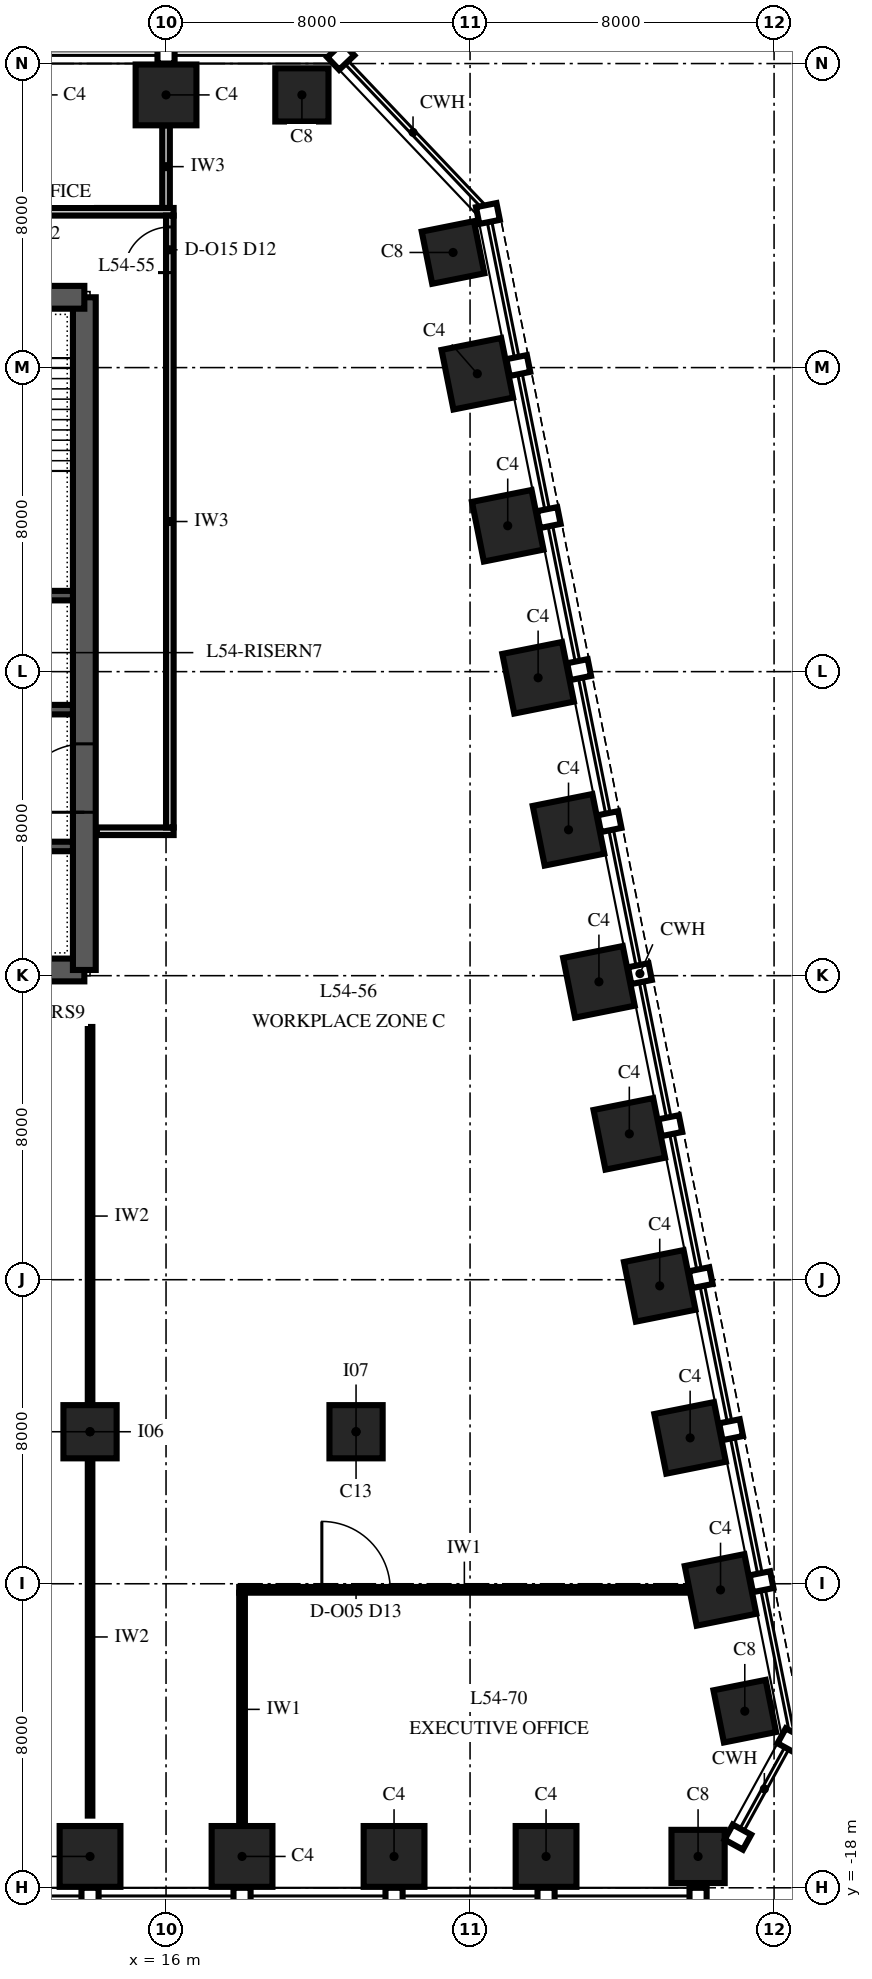
"""IFC4 building model, lengths in metres.
Left out: names, types, materials, properties, quantities, classifications, styles, units other than length and angle.
Written with IfcOpenShell. Run it as: python <this file> out.ifc"""

import sys

from ifc_helpers import new_model, si_unit, direction, frame, frame_2d, origin, origin_2d, place, context, subcontext, project, spatial, polyline, rectangle, outline, extrude, element, fill, save


model = new_model("IFC4")
c1 = context("Model", 3, precision=1e-05, world=origin(), true_north=direction((0.0, 1.0)))
c2 = subcontext(c1, "Body", "Model", "MODEL_VIEW")
j1 = project(units=[si_unit("LENGTHUNIT", "METRE"), si_unit("PLANEANGLEUNIT", "RADIAN")], contexts=[c1])
p1 = place(None, origin())
s1 = spatial("IfcSite", under=j1, at=p1, CompositionType="ELEMENT")
p2 = place(p1, origin())
s2 = spatial("IfcBuilding", under=s1, at=p2, CompositionType="ELEMENT")
p3 = place(p2, frame((0.0, 0.0, 234.0)))
s3 = spatial("IfcBuildingStorey", under=s2, at=p3, CompositionType="ELEMENT", Elevation=234.0)
for number, where, z_axis, x_axis in (
    (1, (14.0, -17.175, 0.0), (0.0, 0.0, 1.0), (1.0, 0.0, 0.0)),
    (2, (18.0, -17.175, 0.0), (0.0, 0.0, 1.0), (1.0, 0.0, 0.0)),
    (3, (22.0, -17.175, 0.0), (0.0, 0.0, 1.0), (1.0, 0.0, 0.0)),
    (4, (26.0, -17.175, 0.0), (0.0, 0.0, 1.0), (1.0, 0.0, 0.0)),
):
    element("IfcColumn", number, at=place(p3, frame(where, z_axis=z_axis, x_axis=x_axis)), inside=s3, PredefinedType="COLUMN", context=c2, shape_type="SweptSolid", body=[
        extrude(rectangle(XDim=1.6, YDim=1.6, at=origin_2d()), origin(), (0.0, 0.0, 1.0), 4.0),
    ])
for number, where, z_axis, x_axis in (
    (5, (30.0, -17.175, 0.0), (0.0, 0.0, 1.0), (1.0, 0.0, 0.0)),
    (6, (31.229, -13.353, 0.0), (0.0, 0.0, 1.0), (-0.196, 0.981, 0.0)),
):
    element("IfcColumn", number, at=place(p3, frame(where, z_axis=z_axis, x_axis=x_axis)), inside=s3, PredefinedType="COLUMN", context=c2, shape_type="SweptSolid", body=[
        extrude(rectangle(XDim=1.4, YDim=1.4, at=origin_2d()), origin(), (0.0, 0.0, 1.0), 4.0),
    ])
for number, where, z_axis, x_axis in (
    (7, (30.591, -10.162, 0.0), (0.0, 0.0, 1.0), (-0.196, 0.981, 0.0)),
    (8, (29.791, -6.162, 0.0), (0.0, 0.0, 1.0), (-0.196, 0.981, 0.0)),
    (9, (28.991, -2.162, 0.0), (0.0, 0.0, 1.0), (-0.196, 0.981, 0.0)),
    (10, (28.191, 1.838, 0.0), (0.0, 0.0, 1.0), (-0.196, 0.981, 0.0)),
    (11, (27.391, 5.838, 0.0), (0.0, 0.0, 1.0), (-0.196, 0.981, 0.0)),
    (12, (26.591, 9.838, 0.0), (0.0, 0.0, 1.0), (-0.196, 0.981, 0.0)),
    (13, (25.791, 13.838, 0.0), (0.0, 0.0, 1.0), (-0.196, 0.981, 0.0)),
    (14, (24.991, 17.838, 0.0), (0.0, 0.0, 1.0), (-0.196, 0.981, 0.0)),
    (15, (24.191, 21.838, 0.0), (0.0, 0.0, 1.0), (-0.196, 0.981, 0.0)),
):
    element("IfcColumn", number, at=place(p3, frame(where, z_axis=z_axis, x_axis=x_axis)), inside=s3, PredefinedType="COLUMN", context=c2, shape_type="SweptSolid", body=[
        extrude(rectangle(XDim=1.6, YDim=1.6, at=origin_2d()), origin(), (0.0, 0.0, 1.0), 4.0),
    ])
for number, where, z_axis, x_axis in (
    (16, (23.553, 25.029, 0.0), (0.0, 0.0, 1.0), (-0.196, 0.981, 0.0)),
    (17, (19.575, 29.175, 0.0), (0.0, 0.0, 1.0), (-1.0, 0.0, 0.0)),
):
    element("IfcColumn", number, at=place(p3, frame(where, z_axis=z_axis, x_axis=x_axis)), inside=s3, PredefinedType="COLUMN", context=c2, shape_type="SweptSolid", body=[
        extrude(rectangle(XDim=1.4, YDim=1.4, at=origin_2d()), origin(), (0.0, 0.0, 1.0), 4.0),
    ])
p4 = place(p3, frame((16.0, 29.175, 0.0), z_axis=(0.0, 0.0, 1.0), x_axis=(-1.0, 0.0, 0.0)))
e18 = element("IfcColumn", 18, at=p4, inside=s3, PredefinedType="COLUMN", context=c2, shape_type="SweptSolid", body=[
    extrude(rectangle(XDim=1.6, YDim=1.6, at=origin_2d()), origin(), (0.0, 0.0, 1.0), 4.0),
])
for number, where, z_axis, x_axis in (
    (19, (14.0, -6.0, 0.0), (0.0, 0.0, 1.0), (1.0, 0.0, 0.0)),
    (20, (21.0, -6.0, 0.0), (0.0, 0.0, 1.0), (1.0, 0.0, 0.0)),
):
    element("IfcColumn", number, at=place(p3, frame(where, z_axis=z_axis, x_axis=x_axis)), inside=s3, PredefinedType="COLUMN", context=c2, shape_type="SweptSolid", body=[
        extrude(rectangle(XDim=1.4, YDim=1.4, at=origin_2d()), origin(), (0.0, 0.0, 1.0), 4.0),
    ])
p5 = place(p3, frame((-13.85, 6.15, 0.0), z_axis=(0.0, 0.0, 1.0), x_axis=(1.0, 0.0, 0.0)))
e21 = element("IfcWall", 21, at=p5, inside=s3, PredefinedType="SHEAR", context=c2, shape_type="SweptSolid", body=[
    extrude(rectangle(XDim=27.7, YDim=0.6, at=frame_2d((13.85, 0.0))), origin(), (0.0, 0.0, 1.0), 4.0),
])
p6 = place(p3, frame((13.85, 6.15, 0.0), z_axis=(0.0, 0.0, 1.0), x_axis=(0.0, 1.0, 0.0)))
e22 = element("IfcWall", 22, at=p6, inside=s3, PredefinedType="SHEAR", context=c2, shape_type="SweptSolid", body=[
    extrude(outline(polyline([(0.0, -0.3), (17.7, -0.3), (17.7, 0.0), (17.4, 0.0), (17.4, 0.3), (0.3, 0.3), (0.3, 0.0), (0.0, 0.0), (0.0, -0.3)])), origin(), (0.0, 0.0, 1.0), 4.0),
])
p7 = place(p6, frame((4.15, 0.0, 0.0)))
e23 = element("IfcOpeningElement", 23, at=p7, cuts=e22, PredefinedType="OPENING", context=c2, shape_type="SweptSolid", body=[
    extrude(rectangle(XDim=1.8, YDim=2.4, at=frame_2d((0.9, 1.2))), frame((0.0, 0.315, 0.0), z_axis=(0.0, -1.0, 0.0), x_axis=(1.0, 0.0, 0.0)), (0.0, 0.0, 1.0), 0.63),
])
p8 = place(p3, frame((13.85, 23.85, 0.0), z_axis=(0.0, 0.0, 1.0), x_axis=(-1.0, 0.0, 0.0)))
e24 = element("IfcWall", 24, at=p8, inside=s3, PredefinedType="SHEAR", context=c2, shape_type="SweptSolid", body=[
    extrude(rectangle(XDim=27.7, YDim=0.6, at=frame_2d((13.85, 0.0))), origin(), (0.0, 0.0, 1.0), 4.0),
])
p9 = place(p8, frame((21.75, 0.0, 0.0)))
e25 = element("IfcOpeningElement", 25, at=p9, cuts=e24, PredefinedType="OPENING", context=c2, shape_type="SweptSolid", body=[
    extrude(rectangle(XDim=1.0, YDim=2.1, at=frame_2d((0.5, 1.05))), frame((0.0, 0.315, 0.0), z_axis=(0.0, -1.0, 0.0), x_axis=(1.0, 0.0, 0.0)), (0.0, 0.0, 1.0), 0.63),
])
p10 = place(p8, frame((4.95, 0.0, 0.0)))
e26 = element("IfcOpeningElement", 26, at=p10, cuts=e24, PredefinedType="OPENING", context=c2, shape_type="SweptSolid", body=[
    extrude(rectangle(XDim=1.0, YDim=2.1, at=frame_2d((0.5, 1.05))), frame((0.0, 0.315, 0.0), z_axis=(0.0, -1.0, 0.0), x_axis=(1.0, 0.0, 0.0)), (0.0, 0.0, 1.0), 0.63),
])
p11 = place(p8, frame((17.35, 0.0, 0.0)))
e27 = element("IfcOpeningElement", 27, at=p11, cuts=e24, PredefinedType="OPENING", context=c2, shape_type="SweptSolid", body=[
    extrude(rectangle(XDim=1.0, YDim=2.1, at=frame_2d((0.5, 1.05))), frame((0.0, 0.315, 0.0), z_axis=(0.0, -1.0, 0.0), x_axis=(1.0, 0.0, 0.0)), (0.0, 0.0, 1.0), 0.63),
])
p12 = place(p8, frame((13.35, 0.0, 0.0)))
e28 = element("IfcOpeningElement", 28, at=p12, cuts=e24, PredefinedType="OPENING", context=c2, shape_type="SweptSolid", body=[
    extrude(rectangle(XDim=1.0, YDim=2.1, at=frame_2d((0.5, 1.05))), frame((0.0, 0.315, 0.0), z_axis=(0.0, -1.0, 0.0), x_axis=(1.0, 0.0, 0.0)), (0.0, 0.0, 1.0), 0.63),
])
p13 = place(p8, frame((9.35, 0.0, 0.0)))
e29 = element("IfcOpeningElement", 29, at=p13, cuts=e24, PredefinedType="OPENING", context=c2, shape_type="SweptSolid", body=[
    extrude(rectangle(XDim=1.0, YDim=2.1, at=frame_2d((0.5, 1.05))), frame((0.0, 0.315, 0.0), z_axis=(0.0, -1.0, 0.0), x_axis=(1.0, 0.0, 0.0)), (0.0, 0.0, 1.0), 0.63),
])
p14 = place(p3, frame((-13.55, 9.4, 0.0), z_axis=(0.0, 0.0, 1.0), x_axis=(1.0, 0.0, 0.0)))
e30 = element("IfcWall", 30, at=p14, inside=s3, PredefinedType="SHEAR", context=c2, shape_type="SweptSolid", body=[
    extrude(rectangle(XDim=27.1, YDim=0.25, at=frame_2d((13.55, 0.0))), origin(), (0.0, 0.0, 1.0), 4.0),
])
p15 = place(p14, frame((0.4, 0.0, 0.0)))
e31 = element("IfcOpeningElement", 31, at=p15, cuts=e30, PredefinedType="OPENING", context=c2, shape_type="SweptSolid", body=[
    extrude(rectangle(XDim=1.1, YDim=2.1, at=frame_2d((0.55, 1.05))), frame((0.0, 0.14, 0.0), z_axis=(0.0, -1.0, 0.0), x_axis=(1.0, 0.0, 0.0)), (0.0, 0.0, 1.0), 0.28),
])
p16 = place(p14, frame((3.2, 0.0, 0.0)))
e32 = element("IfcOpeningElement", 32, at=p16, cuts=e30, PredefinedType="OPENING", context=c2, shape_type="SweptSolid", body=[
    extrude(rectangle(XDim=1.1, YDim=2.1, at=frame_2d((0.55, 1.05))), frame((0.0, 0.14, 0.0), z_axis=(0.0, -1.0, 0.0), x_axis=(1.0, 0.0, 0.0)), (0.0, 0.0, 1.0), 0.28),
])
p17 = place(p14, frame((6.0, 0.0, 0.0)))
e33 = element("IfcOpeningElement", 33, at=p17, cuts=e30, PredefinedType="OPENING", context=c2, shape_type="SweptSolid", body=[
    extrude(rectangle(XDim=1.1, YDim=2.1, at=frame_2d((0.55, 1.05))), frame((0.0, 0.14, 0.0), z_axis=(0.0, -1.0, 0.0), x_axis=(1.0, 0.0, 0.0)), (0.0, 0.0, 1.0), 0.28),
])
p18 = place(p14, frame((17.3, 0.0, 0.0)))
e34 = element("IfcOpeningElement", 34, at=p18, cuts=e30, PredefinedType="OPENING", context=c2, shape_type="SweptSolid", body=[
    extrude(rectangle(XDim=0.9, YDim=2.1, at=frame_2d((0.45, 1.05))), frame((0.0, 0.14, 0.0), z_axis=(0.0, -1.0, 0.0), x_axis=(1.0, 0.0, 0.0)), (0.0, 0.0, 1.0), 0.28),
])
p19 = place(p14, frame((20.1, 0.0, 0.0)))
e35 = element("IfcOpeningElement", 35, at=p19, cuts=e30, PredefinedType="OPENING", context=c2, shape_type="SweptSolid", body=[
    extrude(rectangle(XDim=0.9, YDim=2.1, at=frame_2d((0.45, 1.05))), frame((0.0, 0.14, 0.0), z_axis=(0.0, -1.0, 0.0), x_axis=(1.0, 0.0, 0.0)), (0.0, 0.0, 1.0), 0.28),
])
p20 = place(p14, frame((22.9, 0.0, 0.0)))
e36 = element("IfcOpeningElement", 36, at=p20, cuts=e30, PredefinedType="OPENING", context=c2, shape_type="SweptSolid", body=[
    extrude(rectangle(XDim=0.9, YDim=2.1, at=frame_2d((0.45, 1.05))), frame((0.0, 0.14, 0.0), z_axis=(0.0, -1.0, 0.0), x_axis=(1.0, 0.0, 0.0)), (0.0, 0.0, 1.0), 0.28),
])
p21 = place(p3, frame((-13.55, 13.0, 0.0), z_axis=(0.0, 0.0, 1.0), x_axis=(1.0, 0.0, 0.0)))
e37 = element("IfcWall", 37, at=p21, inside=s3, PredefinedType="SHEAR", context=c2, shape_type="SweptSolid", body=[
    extrude(rectangle(XDim=27.1, YDim=0.25, at=frame_2d((13.55, 0.0))), origin(), (0.0, 0.0, 1.0), 4.0),
])
p22 = place(p21, frame((0.4, 0.0, 0.0)))
e38 = element("IfcOpeningElement", 38, at=p22, cuts=e37, PredefinedType="OPENING", context=c2, shape_type="SweptSolid", body=[
    extrude(rectangle(XDim=1.1, YDim=2.1, at=frame_2d((0.55, 1.05))), frame((0.0, 0.14, 0.0), z_axis=(0.0, -1.0, 0.0), x_axis=(1.0, 0.0, 0.0)), (0.0, 0.0, 1.0), 0.28),
])
p23 = place(p21, frame((3.2, 0.0, 0.0)))
e39 = element("IfcOpeningElement", 39, at=p23, cuts=e37, PredefinedType="OPENING", context=c2, shape_type="SweptSolid", body=[
    extrude(rectangle(XDim=1.1, YDim=2.1, at=frame_2d((0.55, 1.05))), frame((0.0, 0.14, 0.0), z_axis=(0.0, -1.0, 0.0), x_axis=(1.0, 0.0, 0.0)), (0.0, 0.0, 1.0), 0.28),
])
p24 = place(p21, frame((6.0, 0.0, 0.0)))
e40 = element("IfcOpeningElement", 40, at=p24, cuts=e37, PredefinedType="OPENING", context=c2, shape_type="SweptSolid", body=[
    extrude(rectangle(XDim=1.1, YDim=2.1, at=frame_2d((0.55, 1.05))), frame((0.0, 0.14, 0.0), z_axis=(0.0, -1.0, 0.0), x_axis=(1.0, 0.0, 0.0)), (0.0, 0.0, 1.0), 0.28),
])
p25 = place(p21, frame((15.1, 0.0, 0.0)))
e41 = element("IfcOpeningElement", 41, at=p25, cuts=e37, PredefinedType="OPENING", context=c2, shape_type="SweptSolid", body=[
    extrude(rectangle(XDim=0.9, YDim=2.1, at=frame_2d((0.45, 1.05))), frame((0.0, 0.14, 0.0), z_axis=(0.0, -1.0, 0.0), x_axis=(1.0, 0.0, 0.0)), (0.0, 0.0, 1.0), 0.28),
])
p26 = place(p21, frame((17.5, 0.0, 0.0)))
e42 = element("IfcOpeningElement", 42, at=p26, cuts=e37, PredefinedType="OPENING", context=c2, shape_type="SweptSolid", body=[
    extrude(rectangle(XDim=0.9, YDim=2.1, at=frame_2d((0.45, 1.05))), frame((0.0, 0.14, 0.0), z_axis=(0.0, -1.0, 0.0), x_axis=(1.0, 0.0, 0.0)), (0.0, 0.0, 1.0), 0.28),
])
p27 = place(p21, frame((21.1, 0.0, 0.0)))
e43 = element("IfcOpeningElement", 43, at=p27, cuts=e37, PredefinedType="OPENING", context=c2, shape_type="SweptSolid", body=[
    extrude(rectangle(XDim=0.9, YDim=2.1, at=frame_2d((0.45, 1.05))), frame((0.0, 0.14, 0.0), z_axis=(0.0, -1.0, 0.0), x_axis=(1.0, 0.0, 0.0)), (0.0, 0.0, 1.0), 0.28),
])
p28 = place(p3, frame((-13.55, 16.0, 0.0), z_axis=(0.0, 0.0, 1.0), x_axis=(1.0, 0.0, 0.0)))
e44 = element("IfcWall", 44, at=p28, inside=s3, PredefinedType="SHEAR", context=c2, shape_type="SweptSolid", body=[
    extrude(rectangle(XDim=27.1, YDim=0.25, at=frame_2d((13.55, 0.0))), origin(), (0.0, 0.0, 1.0), 4.0),
])
p29 = place(p3, frame((17.925, -10.16, 0.0), z_axis=(0.0, 0.0, 1.0), x_axis=(1.0, 0.0, 0.0)))
e45 = element("IfcWall", 45, at=p29, inside=s3, PredefinedType="PARTITIONING", context=c2, shape_type="SweptSolid", body=[
    extrude(rectangle(XDim=11.85, YDim=0.15, at=frame_2d((5.925, 0.0))), origin(), (0.0, 0.0, 1.0), 3.25),
])
p30 = place(p29, frame((2.175, 0.0, 0.0)))
e46 = element("IfcOpeningElement", 46, at=p30, cuts=e45, PredefinedType="OPENING", context=c2, shape_type="SweptSolid", body=[
    extrude(rectangle(XDim=1.8, YDim=2.4, at=frame_2d((0.9, 1.2))), frame((0.0, 0.09, 0.0), z_axis=(0.0, -1.0, 0.0), x_axis=(1.0, 0.0, 0.0)), (0.0, 0.0, 1.0), 0.18),
])
p31 = place(p3, frame((14.18, 9.8, 0.0), z_axis=(0.0, 0.0, 1.0), x_axis=(1.0, 0.0, 0.0)))
e47 = element("IfcWall", 47, at=p31, inside=s3, PredefinedType="PARTITIONING", context=c2, shape_type="SweptSolid", body=[
    extrude(rectangle(XDim=2.02, YDim=0.2, at=frame_2d((1.01, 0.0))), origin(), (0.0, 0.0, 1.0), 3.85),
])
p32 = place(p3, frame((-15.9, 26.1, 0.0), z_axis=(0.0, 0.0, 1.0), x_axis=(1.0, 0.0, 0.0)))
e48 = element("IfcWall", 48, at=p32, inside=s3, PredefinedType="PARTITIONING", context=c2, shape_type="SweptSolid", body=[
    extrude(rectangle(XDim=32.1, YDim=0.2, at=frame_2d((16.05, 0.0))), origin(), (0.0, 0.0, 1.0), 3.4),
])
p33 = place(p32, frame((3.3, 0.0, 0.0)))
e49 = element("IfcOpeningElement", 49, at=p33, cuts=e48, PredefinedType="OPENING", context=c2, shape_type="SweptSolid", body=[
    extrude(rectangle(XDim=1.2, YDim=2.4, at=frame_2d((0.6, 1.2))), frame((0.0, 0.115, 0.0), z_axis=(0.0, -1.0, 0.0), x_axis=(1.0, 0.0, 0.0)), (0.0, 0.0, 1.0), 0.23),
])
p34 = place(p32, frame((9.3, 0.0, 0.0)))
e50 = element("IfcOpeningElement", 50, at=p34, cuts=e48, PredefinedType="OPENING", context=c2, shape_type="SweptSolid", body=[
    extrude(rectangle(XDim=1.2, YDim=2.4, at=frame_2d((0.6, 1.2))), frame((0.0, 0.115, 0.0), z_axis=(0.0, -1.0, 0.0), x_axis=(1.0, 0.0, 0.0)), (0.0, 0.0, 1.0), 0.23),
])
p35 = place(p32, frame((15.3, 0.0, 0.0)))
e51 = element("IfcOpeningElement", 51, at=p35, cuts=e48, PredefinedType="OPENING", context=c2, shape_type="SweptSolid", body=[
    extrude(rectangle(XDim=1.2, YDim=2.4, at=frame_2d((0.6, 1.2))), frame((0.0, 0.115, 0.0), z_axis=(0.0, -1.0, 0.0), x_axis=(1.0, 0.0, 0.0)), (0.0, 0.0, 1.0), 0.23),
])
p36 = place(p32, frame((21.3, 0.0, 0.0)))
e52 = element("IfcOpeningElement", 52, at=p36, cuts=e48, PredefinedType="OPENING", context=c2, shape_type="SweptSolid", body=[
    extrude(rectangle(XDim=1.2, YDim=2.4, at=frame_2d((0.6, 1.2))), frame((0.0, 0.115, 0.0), z_axis=(0.0, -1.0, 0.0), x_axis=(1.0, 0.0, 0.0)), (0.0, 0.0, 1.0), 0.23),
])
p37 = place(p32, frame((27.3, 0.0, 0.0)))
e53 = element("IfcOpeningElement", 53, at=p37, cuts=e48, PredefinedType="OPENING", context=c2, shape_type="SweptSolid", body=[
    extrude(rectangle(XDim=1.2, YDim=2.4, at=frame_2d((0.6, 1.2))), frame((0.0, 0.115, 0.0), z_axis=(0.0, -1.0, 0.0), x_axis=(1.0, 0.0, 0.0)), (0.0, 0.0, 1.0), 0.23),
])
p38 = place(p3, frame((16.0, 26.2, 0.0), z_axis=(0.0, 0.0, 1.0), x_axis=(0.0, 1.0, 0.0)))
e54 = element("IfcWall", 54, at=p38, inside=s3, PredefinedType="PARTITIONING", context=c2, shape_type="SweptSolid", body=[
    extrude(rectangle(XDim=2.175, YDim=0.2, at=frame_2d((1.087, 0.0))), origin(), (0.0, 0.0, 1.0), 3.4),
])
p39 = place(p3, frame((16.1, 9.9, 0.0), z_axis=(0.0, 0.0, 1.0), x_axis=(0.0, 1.0, 0.0)))
e55 = element("IfcWall", 55, at=p39, inside=s3, PredefinedType="PARTITIONING", context=c2, shape_type="SweptSolid", body=[
    extrude(rectangle(XDim=16.1, YDim=0.2, at=frame_2d((8.05, 0.0))), origin(), (0.0, 0.0, 1.0), 3.25),
])
p40 = place(p39, frame((14.6, 0.0, 0.0)))
e56 = element("IfcOpeningElement", 56, at=p40, cuts=e55, PredefinedType="OPENING", context=c2, shape_type="SweptSolid", body=[
    extrude(rectangle(XDim=1.2, YDim=2.4, at=frame_2d((0.6, 1.2))), frame((0.0, 0.115, 0.0), z_axis=(0.0, -1.0, 0.0), x_axis=(1.0, 0.0, 0.0)), (0.0, 0.0, 1.0), 0.23),
])
p41 = place(p3, frame((18.0, -16.375, 0.0), z_axis=(0.0, 0.0, 1.0), x_axis=(0.0, 1.0, 0.0)))
e57 = element("IfcWall", 57, at=p41, inside=s3, PredefinedType="PARTITIONING", context=c2, shape_type="SweptSolid", body=[
    extrude(rectangle(XDim=6.14, YDim=0.15, at=frame_2d((3.07, 0.0))), origin(), (0.0, 0.0, 1.0), 3.25),
])
p42 = place(p3, frame((14.001, -16.1, 0.0), z_axis=(0.0, 0.0, 1.0), x_axis=(0.0, 1.0, 0.0)))
e58 = element("IfcWall", 58, at=p42, inside=s3, PredefinedType="PARTITIONING", context=c2, shape_type="SweptSolid", body=[
    extrude(rectangle(XDim=9.4, YDim=0.12, at=frame_2d((4.7, 0.0))), origin(), (0.0, 0.0, 1.0), 3.25),
])
p43 = place(p3, frame((14.001, -5.3, 0.0), z_axis=(0.0, 0.0, 1.0), x_axis=(0.0, 1.0, 0.0)))
e59 = element("IfcWall", 59, at=p43, inside=s3, PredefinedType="PARTITIONING", context=c2, shape_type="SweptSolid", body=[
    extrude(rectangle(XDim=9.95, YDim=0.12, at=frame_2d((4.975, 0.0))), origin(), (0.0, 0.0, 1.0), 3.25),
])
p44 = place(p7, origin())
e60 = element("IfcDoor", 60, at=p44, inside=s3, OperationType="DOUBLE_DOOR_SINGLE_SWING", PredefinedType="DOOR", context=c2, shape_type="SweptSolid", body=[
    extrude(rectangle(XDim=1.8, YDim=2.4, at=frame_2d((0.9, 1.2))), frame((0.0, 0.3, 0.0), z_axis=(0.0, -1.0, 0.0), x_axis=(1.0, 0.0, 0.0)), (0.0, 0.0, 1.0), 0.6),
])
fill(e23, e60)
p45 = place(p30, origin())
e61 = element("IfcDoor", 61, at=p45, inside=s3, OperationType="DOUBLE_DOOR_SINGLE_SWING", PredefinedType="DOOR", context=c2, shape_type="SweptSolid", body=[
    extrude(rectangle(XDim=1.8, YDim=2.4, at=frame_2d((0.9, 1.2))), frame((0.0, 0.075, 0.0), z_axis=(0.0, -1.0, 0.0), x_axis=(1.0, 0.0, 0.0)), (0.0, 0.0, 1.0), 0.149),
])
fill(e46, e61)
p46 = place(p40, origin())
e62 = element("IfcDoor", 62, at=p46, inside=s3, OperationType="SINGLE_SWING_LEFT", PredefinedType="DOOR", context=c2, shape_type="SweptSolid", body=[
    extrude(rectangle(XDim=1.2, YDim=2.4, at=frame_2d((0.6, 1.2))), frame((0.0, 0.1, 0.0), z_axis=(0.0, -1.0, 0.0), x_axis=(1.0, 0.0, 0.0)), (0.0, 0.0, 1.0), 0.199),
])
fill(e56, e62)
save(model, sys.argv[1])
